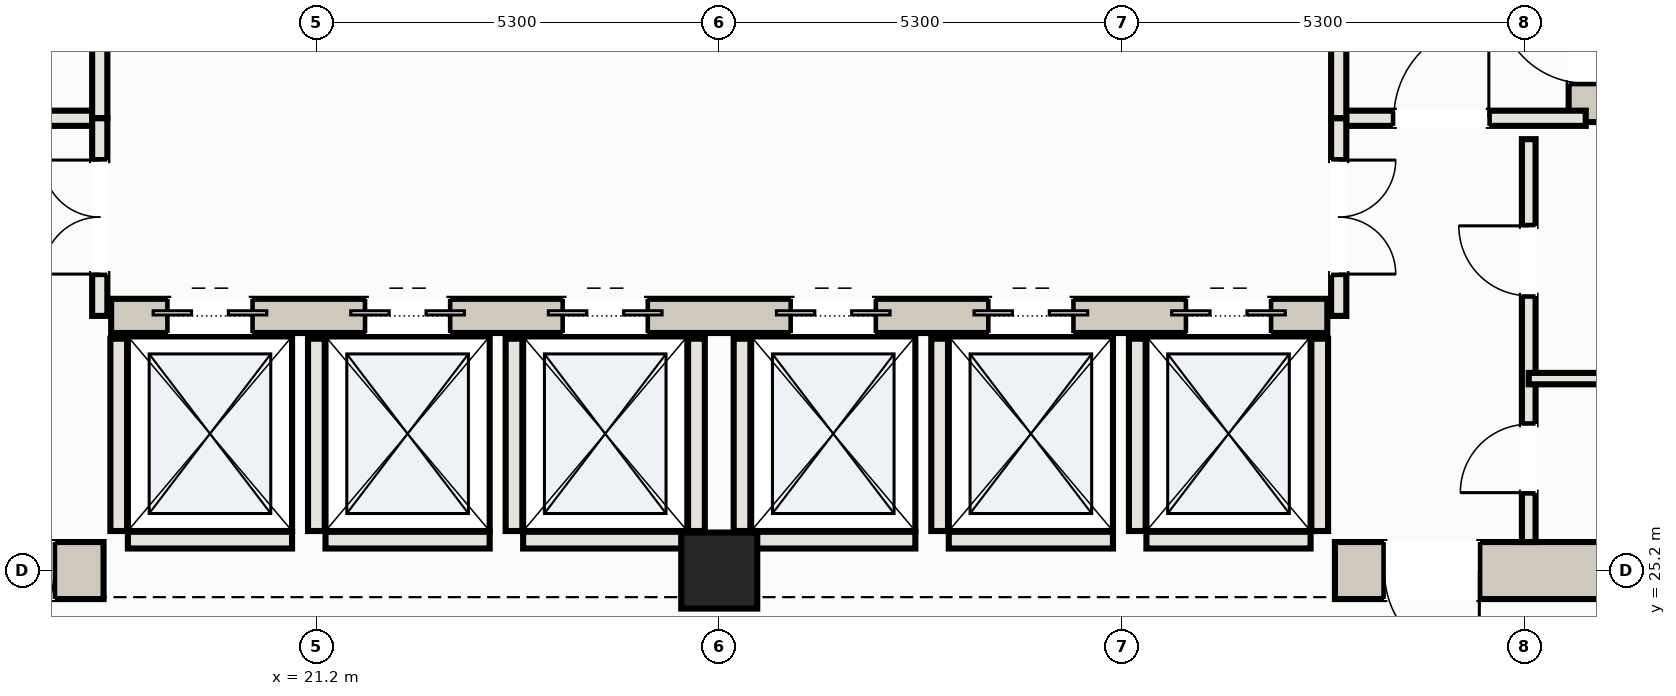
"""IFC4 building model, lengths in metres.
Left out: names, types, materials, properties, quantities, classifications, styles, units other than length and angle.
Written with IfcOpenShell. Run it as: python <this file> out.ifc"""

import sys

from ifc_helpers import new_model, si_unit, direction, frame, frame_2d, origin, origin_2d, place, context, subcontext, project, spatial, rectangle, hollow_rectangle, extrude, element, fill, save


model = new_model("IFC4")
c1 = context("Model", 3, precision=1e-05, world=origin(), true_north=direction((0.0, 1.0)))
c2 = subcontext(c1, "Body", "Model", "MODEL_VIEW")
j1 = project(units=[si_unit("LENGTHUNIT", "METRE"), si_unit("PLANEANGLEUNIT", "RADIAN")], contexts=[c1])
p1 = place(None, origin())
s1 = spatial("IfcSite", under=j1, at=p1, CompositionType="ELEMENT")
p2 = place(p1, origin())
s2 = spatial("IfcBuilding", under=s1, at=p2, CompositionType="ELEMENT")
p3 = place(p2, frame((0.0, 0.0, 77.2)))
s3 = spatial("IfcBuildingStorey", under=s2, at=p3, CompositionType="ELEMENT", Elevation=77.2)
p4 = place(p3, frame((10.225, 25.2, 0.0), z_axis=(0.0, 0.0, 1.0), x_axis=(1.0, 0.0, 0.0)))
e1 = element("IfcWall", 1, at=p4, inside=s3, PredefinedType="SHEAR", context=c2, shape_type="SweptSolid", body=[
    extrude(rectangle(XDim=8.175, YDim=0.75, at=frame_2d((4.087, 0.0))), origin(), (0.0, 0.0, 1.0), 4.29),
])
p5 = place(p4, frame((6.275, 0.0, 0.0)))
e2 = element("IfcOpeningElement", 2, at=p5, cuts=e1, PredefinedType="OPENING", context=c2, shape_type="SweptSolid", body=[
    extrude(rectangle(XDim=1.25, YDim=2.2, at=frame_2d((0.625, 1.1))), frame((0.0, 0.385, 0.0), z_axis=(0.0, -1.0, 0.0), x_axis=(1.0, 0.0, 0.0)), (0.0, 0.0, 1.0), 0.77),
])
p6 = place(p3, frame((34.6, 25.2, 0.0), z_axis=(0.0, 0.0, 1.0), x_axis=(1.0, 0.0, 0.0)))
e3 = element("IfcWall", 3, at=p6, inside=s3, PredefinedType="SHEAR", context=c2, shape_type="SweptSolid", body=[
    extrude(rectangle(XDim=8.175, YDim=0.75, at=frame_2d((4.087, 0.0))), origin(), (0.0, 0.0, 1.0), 4.29),
])
p7 = place(p6, frame((0.65, 0.0, 0.0)))
e4 = element("IfcOpeningElement", 4, at=p7, cuts=e3, PredefinedType="OPENING", context=c2, shape_type="SweptSolid", body=[
    extrude(rectangle(XDim=1.25, YDim=2.2, at=frame_2d((0.625, 1.1))), frame((0.0, 0.385, 0.0), z_axis=(0.0, -1.0, 0.0), x_axis=(1.0, 0.0, 0.0)), (0.0, 0.0, 1.0), 0.77),
])
p8 = place(p3, frame((37.9, 31.1, 0.0), z_axis=(0.0, 0.0, 1.0), x_axis=(0.0, 1.0, 0.0)))
e5 = element("IfcWall", 5, at=p8, inside=s3, PredefinedType="SHEAR", context=c2, shape_type="SweptSolid", body=[
    extrude(rectangle(XDim=8.525, YDim=0.45, at=frame_2d((4.262, 0.0))), origin(), (0.0, 0.0, 1.0), 4.29),
])
p9 = place(p8, frame((0.51, 0.0, 0.0)))
e6 = element("IfcOpeningElement", 6, at=p9, cuts=e5, PredefinedType="OPENING", context=c2, shape_type="SweptSolid", body=[
    extrude(rectangle(XDim=1.15, YDim=2.2, at=frame_2d((0.575, 1.1))), frame((0.0, 0.235, 0.0), z_axis=(0.0, -1.0, 0.0), x_axis=(1.0, 0.0, 0.0)), (0.0, 0.0, 1.0), 0.47),
])
p10 = place(p3, frame((18.5, 28.55, 0.0), z_axis=(0.0, 0.0, 1.0), x_axis=(1.0, 0.0, 0.0)))
e7 = element("IfcWall", 7, at=p10, inside=s3, PredefinedType="SHEAR", context=c2, shape_type="SweptSolid", body=[
    extrude(rectangle(XDim=16.0, YDim=0.45, at=frame_2d((8.0, 0.0))), origin(), (0.0, 0.0, 1.0), 4.29),
])
p11 = place(p10, frame((0.75, 0.0, 0.0)))
e8 = element("IfcOpeningElement", 8, at=p11, cuts=e7, PredefinedType="OPENING", context=c2, shape_type="SweptSolid", body=[
    extrude(rectangle(XDim=1.1, YDim=2.15, at=frame_2d((0.55, 1.075))), frame((0.0, 0.235, 0.0), z_axis=(0.0, -1.0, 0.0), x_axis=(1.0, 0.0, 0.0)), (0.0, 0.0, 1.0), 0.47),
])
p12 = place(p10, frame((3.35, 0.0, 0.0)))
e9 = element("IfcOpeningElement", 9, at=p12, cuts=e7, PredefinedType="OPENING", context=c2, shape_type="SweptSolid", body=[
    extrude(rectangle(XDim=1.1, YDim=2.15, at=frame_2d((0.55, 1.075))), frame((0.0, 0.235, 0.0), z_axis=(0.0, -1.0, 0.0), x_axis=(1.0, 0.0, 0.0)), (0.0, 0.0, 1.0), 0.47),
])
p13 = place(p10, frame((5.95, 0.0, 0.0)))
e10 = element("IfcOpeningElement", 10, at=p13, cuts=e7, PredefinedType="OPENING", context=c2, shape_type="SweptSolid", body=[
    extrude(rectangle(XDim=1.1, YDim=2.15, at=frame_2d((0.55, 1.075))), frame((0.0, 0.235, 0.0), z_axis=(0.0, -1.0, 0.0), x_axis=(1.0, 0.0, 0.0)), (0.0, 0.0, 1.0), 0.47),
])
p14 = place(p10, frame((8.95, 0.0, 0.0)))
e11 = element("IfcOpeningElement", 11, at=p14, cuts=e7, PredefinedType="OPENING", context=c2, shape_type="SweptSolid", body=[
    extrude(rectangle(XDim=1.1, YDim=2.15, at=frame_2d((0.55, 1.075))), frame((0.0, 0.235, 0.0), z_axis=(0.0, -1.0, 0.0), x_axis=(1.0, 0.0, 0.0)), (0.0, 0.0, 1.0), 0.47),
])
p15 = place(p10, frame((11.55, 0.0, 0.0)))
e12 = element("IfcOpeningElement", 12, at=p15, cuts=e7, PredefinedType="OPENING", context=c2, shape_type="SweptSolid", body=[
    extrude(rectangle(XDim=1.1, YDim=2.15, at=frame_2d((0.55, 1.075))), frame((0.0, 0.235, 0.0), z_axis=(0.0, -1.0, 0.0), x_axis=(1.0, 0.0, 0.0)), (0.0, 0.0, 1.0), 0.47),
])
p16 = place(p10, frame((14.15, 0.0, 0.0)))
e13 = element("IfcOpeningElement", 13, at=p16, cuts=e7, PredefinedType="OPENING", context=c2, shape_type="SweptSolid", body=[
    extrude(rectangle(XDim=1.1, YDim=2.15, at=frame_2d((0.55, 1.075))), frame((0.0, 0.235, 0.0), z_axis=(0.0, -1.0, 0.0), x_axis=(1.0, 0.0, 0.0)), (0.0, 0.0, 1.0), 0.47),
])
p17 = place(p3, frame((26.5, 25.2, 0.0), z_axis=(0.0, 0.0, 1.0), x_axis=(1.0, 0.0, 0.0)))
e14 = element("IfcColumn", 14, at=p17, inside=s3, PredefinedType="COLUMN", context=c2, shape_type="SweptSolid", body=[
    extrude(hollow_rectangle(XDim=1.0, YDim=1.0, WallThickness=0.036, at=origin_2d()), origin(), (0.0, 0.0, 1.0), 4.5),
])
p18 = place(p3, frame((18.6, 25.72, 0.0), z_axis=(0.0, 0.0, 1.0), x_axis=(0.0, 1.0, 0.0)))
e15 = element("IfcWall", 15, at=p18, inside=s3, PredefinedType="SOLIDWALL", context=c2, shape_type="SweptSolid", body=[
    extrude(rectangle(XDim=2.53, YDim=0.22, at=frame_2d((1.265, 0.0))), origin(), (0.0, 0.0, 1.0), 4.29),
])
p19 = place(p3, frame((18.72, 25.6, 0.0), z_axis=(0.0, 0.0, 1.0), x_axis=(1.0, 0.0, 0.0)))
e16 = element("IfcWall", 16, at=p19, inside=s3, PredefinedType="SOLIDWALL", context=c2, shape_type="SweptSolid", body=[
    extrude(rectangle(XDim=2.16, YDim=0.22, at=frame_2d((1.08, 0.0))), origin(), (0.0, 0.0, 1.0), 4.29),
])
p20 = place(p3, frame((21.2, 25.72, 0.0), z_axis=(0.0, 0.0, 1.0), x_axis=(0.0, 1.0, 0.0)))
e17 = element("IfcWall", 17, at=p20, inside=s3, PredefinedType="SOLIDWALL", context=c2, shape_type="SweptSolid", body=[
    extrude(rectangle(XDim=2.53, YDim=0.22, at=frame_2d((1.265, 0.0))), origin(), (0.0, 0.0, 1.0), 4.29),
])
p21 = place(p3, frame((21.32, 25.6, 0.0), z_axis=(0.0, 0.0, 1.0), x_axis=(1.0, 0.0, 0.0)))
e18 = element("IfcWall", 18, at=p21, inside=s3, PredefinedType="SOLIDWALL", context=c2, shape_type="SweptSolid", body=[
    extrude(rectangle(XDim=2.16, YDim=0.22, at=frame_2d((1.08, 0.0))), origin(), (0.0, 0.0, 1.0), 4.29),
])
for number, where, z_axis, x_axis in (
    (19, (23.8, 25.72, 0.0), (0.0, 0.0, 1.0), (0.0, 1.0, 0.0)),
    (20, (26.2, 25.72, 0.0), (0.0, 0.0, 1.0), (0.0, 1.0, 0.0)),
):
    element("IfcWall", number, at=place(p3, frame(where, z_axis=z_axis, x_axis=x_axis)), inside=s3, PredefinedType="SOLIDWALL", context=c2, shape_type="SweptSolid", body=[
        extrude(rectangle(XDim=2.53, YDim=0.22, at=frame_2d((1.265, 0.0))), origin(), (0.0, 0.0, 1.0), 4.29),
    ])
p22 = place(p3, frame((23.92, 25.6, 0.0), z_axis=(0.0, 0.0, 1.0), x_axis=(1.0, 0.0, 0.0)))
e21 = element("IfcWall", 21, at=p22, inside=s3, PredefinedType="SOLIDWALL", context=c2, shape_type="SweptSolid", body=[
    extrude(rectangle(XDim=2.16, YDim=0.22, at=frame_2d((1.08, 0.0))), origin(), (0.0, 0.0, 1.0), 4.29),
])
p23 = place(p3, frame((26.8, 25.72, 0.0), z_axis=(0.0, 0.0, 1.0), x_axis=(0.0, 1.0, 0.0)))
e22 = element("IfcWall", 22, at=p23, inside=s3, PredefinedType="SOLIDWALL", context=c2, shape_type="SweptSolid", body=[
    extrude(rectangle(XDim=2.53, YDim=0.22, at=frame_2d((1.265, 0.0))), origin(), (0.0, 0.0, 1.0), 4.29),
])
p24 = place(p3, frame((26.92, 25.6, 0.0), z_axis=(0.0, 0.0, 1.0), x_axis=(1.0, 0.0, 0.0)))
e23 = element("IfcWall", 23, at=p24, inside=s3, PredefinedType="SOLIDWALL", context=c2, shape_type="SweptSolid", body=[
    extrude(rectangle(XDim=2.16, YDim=0.22, at=frame_2d((1.08, 0.0))), origin(), (0.0, 0.0, 1.0), 4.29),
])
p25 = place(p3, frame((29.4, 25.72, 0.0), z_axis=(0.0, 0.0, 1.0), x_axis=(0.0, 1.0, 0.0)))
e24 = element("IfcWall", 24, at=p25, inside=s3, PredefinedType="SOLIDWALL", context=c2, shape_type="SweptSolid", body=[
    extrude(rectangle(XDim=2.53, YDim=0.22, at=frame_2d((1.265, 0.0))), origin(), (0.0, 0.0, 1.0), 4.29),
])
p26 = place(p3, frame((29.52, 25.6, 0.0), z_axis=(0.0, 0.0, 1.0), x_axis=(1.0, 0.0, 0.0)))
e25 = element("IfcWall", 25, at=p26, inside=s3, PredefinedType="SOLIDWALL", context=c2, shape_type="SweptSolid", body=[
    extrude(rectangle(XDim=2.16, YDim=0.22, at=frame_2d((1.08, 0.0))), origin(), (0.0, 0.0, 1.0), 4.29),
])
for number, where, z_axis, x_axis in (
    (26, (32.0, 25.72, 0.0), (0.0, 0.0, 1.0), (0.0, 1.0, 0.0)),
    (27, (34.4, 25.72, 0.0), (0.0, 0.0, 1.0), (0.0, 1.0, 0.0)),
):
    element("IfcWall", number, at=place(p3, frame(where, z_axis=z_axis, x_axis=x_axis)), inside=s3, PredefinedType="SOLIDWALL", context=c2, shape_type="SweptSolid", body=[
        extrude(rectangle(XDim=2.53, YDim=0.22, at=frame_2d((1.265, 0.0))), origin(), (0.0, 0.0, 1.0), 4.29),
    ])
p27 = place(p3, frame((32.12, 25.6, 0.0), z_axis=(0.0, 0.0, 1.0), x_axis=(1.0, 0.0, 0.0)))
e28 = element("IfcWall", 28, at=p27, inside=s3, PredefinedType="SOLIDWALL", context=c2, shape_type="SweptSolid", body=[
    extrude(rectangle(XDim=2.16, YDim=0.22, at=frame_2d((1.08, 0.0))), origin(), (0.0, 0.0, 1.0), 4.29),
])
p28 = place(p3, frame((15.1, 31.15, 0.0), z_axis=(0.0, 0.0, 1.0), x_axis=(1.0, 0.0, 0.0)))
e29 = element("IfcWall", 29, at=p28, inside=s3, PredefinedType="PARTITIONING", context=c2, shape_type="SweptSolid", body=[
    extrude(rectangle(XDim=3.25, YDim=0.2, at=frame_2d((1.625, 0.0))), origin(), (0.0, 0.0, 1.0), 4.29),
])
p29 = place(p28, frame((1.275, 0.0, 0.0)))
e30 = element("IfcOpeningElement", 30, at=p29, cuts=e29, PredefinedType="OPENING", context=c2, shape_type="SweptSolid", body=[
    extrude(rectangle(XDim=1.25, YDim=2.2, at=frame_2d((0.625, 1.1))), frame((0.0, 0.11, 0.0), z_axis=(0.0, -1.0, 0.0), x_axis=(1.0, 0.0, 0.0)), (0.0, 0.0, 1.0), 0.22),
])
p30 = place(p3, frame((18.35, 31.15, 0.0), z_axis=(0.0, 0.0, 1.0), x_axis=(0.0, 1.0, 0.0)))
e31 = element("IfcWall", 31, at=p30, inside=s3, PredefinedType="PARTITIONING", context=c2, shape_type="SweptSolid", body=[
    extrude(rectangle(XDim=5.15, YDim=0.2, at=frame_2d((2.575, 0.0))), origin(), (0.0, 0.0, 1.0), 4.29),
])
p31 = place(p30, frame((1.875, 0.0, 0.0)))
e32 = element("IfcOpeningElement", 32, at=p31, cuts=e31, PredefinedType="OPENING", context=c2, shape_type="SweptSolid", body=[
    extrude(rectangle(XDim=1.25, YDim=2.2, at=frame_2d((0.625, 1.1))), frame((0.0, 0.11, 0.0), z_axis=(0.0, -1.0, 0.0), x_axis=(1.0, 0.0, 0.0)), (0.0, 0.0, 1.0), 0.22),
])
p32 = place(p3, frame((34.65, 31.15, 0.0), z_axis=(0.0, 0.0, 1.0), x_axis=(1.0, 0.0, 0.0)))
e33 = element("IfcWall", 33, at=p32, inside=s3, PredefinedType="PARTITIONING", context=c2, shape_type="SweptSolid", body=[
    extrude(rectangle(XDim=3.25, YDim=0.2, at=frame_2d((1.625, 0.0))), origin(), (0.0, 0.0, 1.0), 4.29),
])
p33 = place(p32, frame((0.725, 0.0, 0.0)))
e34 = element("IfcOpeningElement", 34, at=p33, cuts=e33, PredefinedType="OPENING", context=c2, shape_type="SweptSolid", body=[
    extrude(rectangle(XDim=1.25, YDim=2.2, at=frame_2d((0.625, 1.1))), frame((0.0, 0.11, 0.0), z_axis=(0.0, -1.0, 0.0), x_axis=(1.0, 0.0, 0.0)), (0.0, 0.0, 1.0), 0.22),
])
p34 = place(p3, frame((34.65, 31.15, 0.0), z_axis=(0.0, 0.0, 1.0), x_axis=(0.0, 1.0, 0.0)))
e35 = element("IfcWall", 35, at=p34, inside=s3, PredefinedType="PARTITIONING", context=c2, shape_type="SweptSolid", body=[
    extrude(rectangle(XDim=5.15, YDim=0.2, at=frame_2d((2.575, 0.0))), origin(), (0.0, 0.0, 1.0), 4.29),
])
p35 = place(p34, frame((1.875, 0.0, 0.0)))
e36 = element("IfcOpeningElement", 36, at=p35, cuts=e35, PredefinedType="OPENING", context=c2, shape_type="SweptSolid", body=[
    extrude(rectangle(XDim=1.25, YDim=2.2, at=frame_2d((0.625, 1.1))), frame((0.0, 0.11, 0.0), z_axis=(0.0, -1.0, 0.0), x_axis=(1.0, 0.0, 0.0)), (0.0, 0.0, 1.0), 0.22),
])
p36 = place(p3, frame((37.15, 25.575, 0.0), z_axis=(0.0, 0.0, 1.0), x_axis=(0.0, 1.0, 0.0)))
e37 = element("IfcWall", 37, at=p36, inside=s3, PredefinedType="PARTITIONING", context=c2, shape_type="SweptSolid", body=[
    extrude(rectangle(XDim=5.3, YDim=0.18, at=frame_2d((2.65, 0.0))), origin(), (0.0, 0.0, 1.0), 4.29),
])
p37 = place(p36, frame((0.65, 0.0, 0.0)))
e38 = element("IfcOpeningElement", 38, at=p37, cuts=e37, PredefinedType="OPENING", context=c2, shape_type="SweptSolid", body=[
    extrude(rectangle(XDim=0.9, YDim=2.15, at=frame_2d((0.45, 1.075))), frame((0.0, 0.1, 0.0), z_axis=(0.0, -1.0, 0.0), x_axis=(1.0, 0.0, 0.0)), (0.0, 0.0, 1.0), 0.2),
])
p38 = place(p36, frame((3.24, 0.0, 0.0)))
e39 = element("IfcOpeningElement", 39, at=p38, cuts=e37, PredefinedType="OPENING", context=c2, shape_type="SweptSolid", body=[
    extrude(rectangle(XDim=0.92, YDim=2.15, at=frame_2d((0.46, 1.075))), frame((0.0, 0.1, 0.0), z_axis=(0.0, -1.0, 0.0), x_axis=(1.0, 0.0, 0.0)), (0.0, 0.0, 1.0), 0.2),
])
p39 = place(p3, frame((37.15, 27.725, 0.0), z_axis=(0.0, 0.0, 1.0), x_axis=(1.0, 0.0, 0.0)))
e40 = element("IfcWall", 40, at=p39, inside=s3, PredefinedType="PARTITIONING", context=c2, shape_type="SweptSolid", body=[
    extrude(rectangle(XDim=4.875, YDim=0.15, at=frame_2d((2.438, 0.0))), origin(), (0.0, 0.0, 1.0), 4.29),
])
p40 = place(p3, frame((18.35, 28.55, 0.0), z_axis=(0.0, 0.0, 1.0), x_axis=(0.0, 1.0, 0.0)))
e41 = element("IfcWall", 41, at=p40, inside=s3, PredefinedType="PARTITIONING", context=c2, shape_type="SweptSolid", body=[
    extrude(rectangle(XDim=2.6, YDim=0.2, at=frame_2d((1.3, 0.0))), origin(), (0.0, 0.0, 1.0), 4.29),
])
p41 = place(p40, frame((0.55, 0.0, 0.0)))
e42 = element("IfcOpeningElement", 42, at=p41, cuts=e41, PredefinedType="OPENING", context=c2, shape_type="SweptSolid", body=[
    extrude(rectangle(XDim=1.5, YDim=2.25, at=frame_2d((0.75, 1.125))), frame((0.0, 0.11, 0.0), z_axis=(0.0, -1.0, 0.0), x_axis=(1.0, 0.0, 0.0)), (0.0, 0.0, 1.0), 0.22),
])
p42 = place(p3, frame((34.65, 28.55, 0.0), z_axis=(0.0, 0.0, 1.0), x_axis=(0.0, 1.0, 0.0)))
e43 = element("IfcWall", 43, at=p42, inside=s3, PredefinedType="PARTITIONING", context=c2, shape_type="SweptSolid", body=[
    extrude(rectangle(XDim=2.6, YDim=0.2, at=frame_2d((1.3, 0.0))), origin(), (0.0, 0.0, 1.0), 4.29),
])
p43 = place(p42, frame((0.55, 0.0, 0.0)))
e44 = element("IfcOpeningElement", 44, at=p43, cuts=e43, PredefinedType="OPENING", context=c2, shape_type="SweptSolid", body=[
    extrude(rectangle(XDim=1.5, YDim=2.25, at=frame_2d((0.75, 1.125))), frame((0.0, 0.11, 0.0), z_axis=(0.0, -1.0, 0.0), x_axis=(1.0, 0.0, 0.0)), (0.0, 0.0, 1.0), 0.22),
])
p44 = place(p11, origin())
e45 = element("IfcDoor", 45, at=p44, inside=s3, OperationType="DOUBLE_DOOR_SLIDING", PredefinedType="DOOR", context=c2, shape_type="SweptSolid", body=[
    extrude(rectangle(XDim=1.1, YDim=2.15, at=frame_2d((0.55, 1.075))), frame((0.0, 0.025, 0.0), z_axis=(0.0, -1.0, 0.0), x_axis=(1.0, 0.0, 0.0)), (0.0, 0.0, 1.0), 0.05),
])
fill(e8, e45)
p45 = place(p12, origin())
e46 = element("IfcDoor", 46, at=p45, inside=s3, OperationType="DOUBLE_DOOR_SLIDING", PredefinedType="DOOR", context=c2, shape_type="SweptSolid", body=[
    extrude(rectangle(XDim=1.1, YDim=2.15, at=frame_2d((0.55, 1.075))), frame((0.0, 0.025, 0.0), z_axis=(0.0, -1.0, 0.0), x_axis=(1.0, 0.0, 0.0)), (0.0, 0.0, 1.0), 0.05),
])
fill(e9, e46)
p46 = place(p13, origin())
e47 = element("IfcDoor", 47, at=p46, inside=s3, OperationType="DOUBLE_DOOR_SLIDING", PredefinedType="DOOR", context=c2, shape_type="SweptSolid", body=[
    extrude(rectangle(XDim=1.1, YDim=2.15, at=frame_2d((0.55, 1.075))), frame((0.0, 0.025, 0.0), z_axis=(0.0, -1.0, 0.0), x_axis=(1.0, 0.0, 0.0)), (0.0, 0.0, 1.0), 0.05),
])
fill(e10, e47)
p47 = place(p14, origin())
e48 = element("IfcDoor", 48, at=p47, inside=s3, OperationType="DOUBLE_DOOR_SLIDING", PredefinedType="DOOR", context=c2, shape_type="SweptSolid", body=[
    extrude(rectangle(XDim=1.1, YDim=2.15, at=frame_2d((0.55, 1.075))), frame((0.0, 0.025, 0.0), z_axis=(0.0, -1.0, 0.0), x_axis=(1.0, 0.0, 0.0)), (0.0, 0.0, 1.0), 0.05),
])
fill(e11, e48)
p48 = place(p15, origin())
e49 = element("IfcDoor", 49, at=p48, inside=s3, OperationType="DOUBLE_DOOR_SLIDING", PredefinedType="DOOR", context=c2, shape_type="SweptSolid", body=[
    extrude(rectangle(XDim=1.1, YDim=2.15, at=frame_2d((0.55, 1.075))), frame((0.0, 0.025, 0.0), z_axis=(0.0, -1.0, 0.0), x_axis=(1.0, 0.0, 0.0)), (0.0, 0.0, 1.0), 0.05),
])
fill(e12, e49)
p49 = place(p16, origin())
e50 = element("IfcDoor", 50, at=p49, inside=s3, OperationType="DOUBLE_DOOR_SLIDING", PredefinedType="DOOR", context=c2, shape_type="SweptSolid", body=[
    extrude(rectangle(XDim=1.1, YDim=2.15, at=frame_2d((0.55, 1.075))), frame((0.0, 0.025, 0.0), z_axis=(0.0, -1.0, 0.0), x_axis=(1.0, 0.0, 0.0)), (0.0, 0.0, 1.0), 0.05),
])
fill(e13, e50)
p50 = place(p5, frame((1.25, 0.0, 0.0), z_axis=(0.0, 0.0, 1.0), x_axis=(-1.0, 0.0, 0.0)))
e51 = element("IfcDoor", 51, at=p50, inside=s3, OperationType="SINGLE_SWING_RIGHT", PredefinedType="DOOR", context=c2, shape_type="SweptSolid", body=[
    extrude(rectangle(XDim=1.25, YDim=2.2, at=frame_2d((0.625, 1.1))), frame((0.0, 0.025, 0.0), z_axis=(0.0, -1.0, 0.0), x_axis=(1.0, 0.0, 0.0)), (0.0, 0.0, 1.0), 0.05),
])
fill(e2, e51)
p51 = place(p7, frame((1.25, 0.0, 0.0), z_axis=(0.0, 0.0, 1.0), x_axis=(-1.0, 0.0, 0.0)))
e52 = element("IfcDoor", 52, at=p51, inside=s3, OperationType="SINGLE_SWING_LEFT", PredefinedType="DOOR", context=c2, shape_type="SweptSolid", body=[
    extrude(rectangle(XDim=1.25, YDim=2.2, at=frame_2d((0.625, 1.1))), frame((0.0, 0.025, 0.0), z_axis=(0.0, -1.0, 0.0), x_axis=(1.0, 0.0, 0.0)), (0.0, 0.0, 1.0), 0.05),
])
fill(e4, e52)
p52 = place(p33, origin())
e53 = element("IfcDoor", 53, at=p52, inside=s3, OperationType="SINGLE_SWING_RIGHT", PredefinedType="DOOR", context=c2, shape_type="SweptSolid", body=[
    extrude(rectangle(XDim=1.25, YDim=2.2, at=frame_2d((0.625, 1.1))), frame((0.0, 0.025, 0.0), z_axis=(0.0, -1.0, 0.0), x_axis=(1.0, 0.0, 0.0)), (0.0, 0.0, 1.0), 0.05),
])
fill(e34, e53)
p53 = place(p9, origin())
e54 = element("IfcDoor", 54, at=p53, inside=s3, OperationType="SINGLE_SWING_RIGHT", PredefinedType="DOOR", context=c2, shape_type="SweptSolid", body=[
    extrude(rectangle(XDim=1.15, YDim=2.2, at=frame_2d((0.575, 1.1))), frame((0.0, 0.025, 0.0), z_axis=(0.0, -1.0, 0.0), x_axis=(1.0, 0.0, 0.0)), (0.0, 0.0, 1.0), 0.05),
])
fill(e6, e54)
p54 = place(p37, origin())
e55 = element("IfcDoor", 55, at=p54, inside=s3, OperationType="SINGLE_SWING_LEFT", PredefinedType="DOOR", context=c2, shape_type="SweptSolid", body=[
    extrude(rectangle(XDim=0.9, YDim=2.15, at=frame_2d((0.45, 1.075))), frame((0.0, 0.025, 0.0), z_axis=(0.0, -1.0, 0.0), x_axis=(1.0, 0.0, 0.0)), (0.0, 0.0, 1.0), 0.05),
])
fill(e38, e55)
p55 = place(p38, origin())
e56 = element("IfcDoor", 56, at=p55, inside=s3, OperationType="SINGLE_SWING_RIGHT", PredefinedType="DOOR", context=c2, shape_type="SweptSolid", body=[
    extrude(rectangle(XDim=0.92, YDim=2.15, at=frame_2d((0.46, 1.075))), frame((0.0, 0.025, 0.0), z_axis=(0.0, -1.0, 0.0), x_axis=(1.0, 0.0, 0.0)), (0.0, 0.0, 1.0), 0.05),
])
fill(e39, e56)
p56 = place(p41, origin())
e57 = element("IfcDoor", 57, at=p56, inside=s3, OperationType="DOUBLE_DOOR_SINGLE_SWING", PredefinedType="DOOR", context=c2, shape_type="SweptSolid", body=[
    extrude(rectangle(XDim=1.5, YDim=2.25, at=frame_2d((0.75, 1.125))), frame((0.0, 0.025, 0.0), z_axis=(0.0, -1.0, 0.0), x_axis=(1.0, 0.0, 0.0)), (0.0, 0.0, 1.0), 0.05),
])
fill(e42, e57)
p57 = place(p43, frame((1.5, 0.0, 0.0), z_axis=(0.0, 0.0, 1.0), x_axis=(-1.0, 0.0, 0.0)))
e58 = element("IfcDoor", 58, at=p57, inside=s3, OperationType="DOUBLE_DOOR_SINGLE_SWING", PredefinedType="DOOR", context=c2, shape_type="SweptSolid", body=[
    extrude(rectangle(XDim=1.5, YDim=2.25, at=frame_2d((0.75, 1.125))), frame((0.0, 0.025, 0.0), z_axis=(0.0, -1.0, 0.0), x_axis=(1.0, 0.0, 0.0)), (0.0, 0.0, 1.0), 0.05),
])
fill(e44, e58)
save(model, sys.argv[1])
